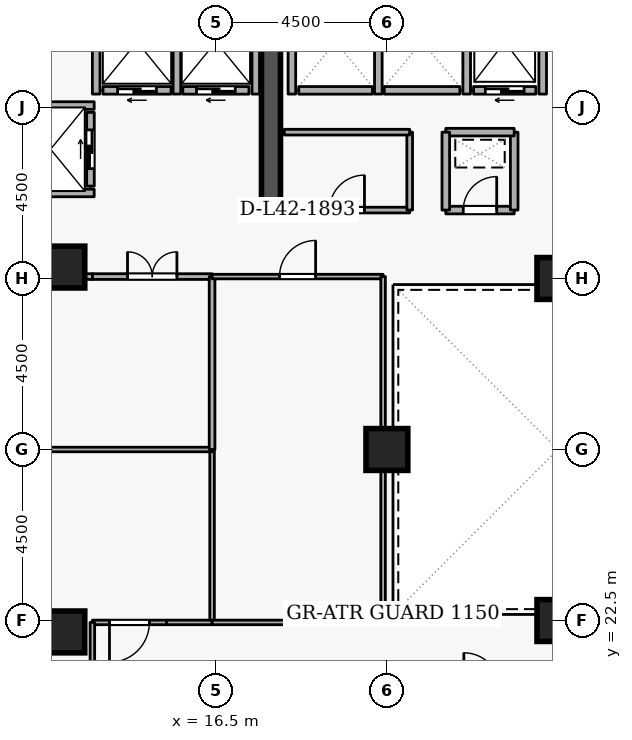
"""IFC4 building model, lengths in metres.
Left out: names, types, materials, properties, quantities, classifications, styles, units other than length and angle.
Written with IfcOpenShell. Run it as: python <this file> out.ifc"""

import sys

from ifc_helpers import new_model, si_unit, direction, frame, frame_2d, origin, origin_2d, place, context, subcontext, project, spatial, rectangle, extrude, element, fill, save


model = new_model("IFC4")
c1 = context("Model", 3, precision=1e-05, world=origin(), true_north=direction((0.0, 1.0)))
c2 = subcontext(c1, "Body", "Model", "MODEL_VIEW")
j1 = project(units=[si_unit("LENGTHUNIT", "METRE"), si_unit("PLANEANGLEUNIT", "RADIAN")], contexts=[c1])
p1 = place(None, origin())
s1 = spatial("IfcSite", under=j1, at=p1, CompositionType="ELEMENT")
p2 = place(p1, origin())
s2 = spatial("IfcBuilding", under=s1, at=p2, CompositionType="ELEMENT")
p3 = place(p2, frame((0.0, 0.0, 159.9)))
s3 = spatial("IfcBuildingStorey", under=s2, at=p3, CompositionType="ELEMENT", Elevation=159.9)
p4 = place(p3, frame((17.95, 33.1, 0.0), z_axis=(0.0, 0.0, 1.0), x_axis=(0.0, 1.0, 0.0)))
e1 = element("IfcWall", 1, at=p4, inside=s3, PredefinedType="SHEAR", context=c2, shape_type="SweptSolid", body=[
    extrude(rectangle(XDim=5.8, YDim=0.5, at=frame_2d((2.9, 0.0))), origin(), (0.0, 0.0, 1.0), 3.6),
])
for number, where, z_axis, x_axis in (
    (2, (12.5, 22.2, 0.0), (0.0, 0.0, 1.0), (1.0, 0.0, 0.0)),
    (3, (12.5, 31.8, 0.0), (0.0, 0.0, 1.0), (1.0, 0.0, 0.0)),
    (4, (25.5, 22.5, 0.0), (0.0, 0.0, 1.0), (1.0, 0.0, 0.0)),
    (5, (25.5, 31.5, 0.0), (0.0, 0.0, 1.0), (1.0, 0.0, 0.0)),
    (6, (21.0, 27.0, 0.0), (0.0, 0.0, 1.0), (1.0, 0.0, 0.0)),
):
    element("IfcColumn", number, at=place(p3, frame(where, z_axis=z_axis, x_axis=x_axis)), inside=s3, PredefinedType="COLUMN", context=c2, shape_type="SweptSolid", body=[
        extrude(rectangle(XDim=1.1, YDim=1.1, at=origin_2d()), origin(), (0.0, 0.0, 1.0), 3.6),
    ])
p5 = place(p3, frame((24.92, 36.45, 0.0), z_axis=(0.0, 0.0, 1.0), x_axis=(-1.0, 0.0, 0.0)))
e7 = element("IfcWall", 7, at=p5, inside=s3, PredefinedType="STANDARD", context=c2, shape_type="SweptSolid", body=[
    extrude(rectangle(XDim=1.64, YDim=0.2, at=frame_2d((0.82, 0.0))), origin(), (0.0, 0.0, 1.0), 3.34),
])
p6 = place(p5, frame((0.31, 0.0, 0.0)))
e8 = element("IfcOpeningElement", 8, at=p6, cuts=e7, PredefinedType="OPENING", context=c2, shape_type="SweptSolid", body=[
    extrude(rectangle(XDim=1.02, YDim=2.06, at=frame_2d((0.51, 1.03))), frame((0.0, 0.11, 0.0), z_axis=(0.0, -1.0, 0.0), x_axis=(1.0, 0.0, 0.0)), (0.0, 0.0, 1.0), 0.22),
])
p7 = place(p3, frame((22.92, 36.45, 0.0), z_axis=(0.0, 0.0, 1.0), x_axis=(-1.0, 0.0, 0.0)))
e9 = element("IfcWall", 9, at=p7, inside=s3, PredefinedType="STANDARD", context=c2, shape_type="SweptSolid", body=[
    extrude(rectangle(XDim=1.99, YDim=0.2, at=frame_2d((0.995, 0.0))), origin(), (0.0, 0.0, 1.0), 3.34),
])
p8 = place(p3, frame((20.62, 36.45, 0.0), z_axis=(0.0, 0.0, 1.0), x_axis=(-1.0, 0.0, 0.0)))
e10 = element("IfcWall", 10, at=p8, inside=s3, PredefinedType="STANDARD", context=c2, shape_type="SweptSolid", body=[
    extrude(rectangle(XDim=1.94, YDim=0.2, at=frame_2d((0.97, 0.0))), origin(), (0.0, 0.0, 1.0), 3.34),
])
p9 = place(p3, frame((17.37, 36.45, 0.0), z_axis=(0.0, 0.0, 1.0), x_axis=(-1.0, 0.0, 0.0)))
e11 = element("IfcWall", 11, at=p9, inside=s3, PredefinedType="STANDARD", context=c2, shape_type="SweptSolid", body=[
    extrude(rectangle(XDim=1.74, YDim=0.2, at=frame_2d((0.87, 0.0))), origin(), (0.0, 0.0, 1.0), 3.34),
])
p10 = place(p9, frame((0.36, 0.0, 0.0)))
e12 = element("IfcOpeningElement", 12, at=p10, cuts=e11, PredefinedType="OPENING", context=c2, shape_type="SweptSolid", body=[
    extrude(rectangle(XDim=1.02, YDim=2.06, at=frame_2d((0.51, 1.03))), frame((0.0, 0.11, 0.0), z_axis=(0.0, -1.0, 0.0), x_axis=(1.0, 0.0, 0.0)), (0.0, 0.0, 1.0), 0.22),
])
p11 = place(p3, frame((15.32, 36.45, 0.0), z_axis=(0.0, 0.0, 1.0), x_axis=(-1.0, 0.0, 0.0)))
e13 = element("IfcWall", 13, at=p11, inside=s3, PredefinedType="STANDARD", context=c2, shape_type="SweptSolid", body=[
    extrude(rectangle(XDim=1.79, YDim=0.2, at=frame_2d((0.895, 0.0))), origin(), (0.0, 0.0, 1.0), 3.34),
])
p12 = place(p11, frame((0.385, 0.0, 0.0)))
e14 = element("IfcOpeningElement", 14, at=p12, cuts=e13, PredefinedType="OPENING", context=c2, shape_type="SweptSolid", body=[
    extrude(rectangle(XDim=1.02, YDim=2.06, at=frame_2d((0.51, 1.03))), frame((0.0, 0.11, 0.0), z_axis=(0.0, -1.0, 0.0), x_axis=(1.0, 0.0, 0.0)), (0.0, 0.0, 1.0), 0.22),
])
p13 = place(p3, frame((13.2, 33.93, 0.0), z_axis=(0.0, 0.0, 1.0), x_axis=(0.0, 1.0, 0.0)))
e15 = element("IfcWall", 15, at=p13, inside=s3, PredefinedType="STANDARD", context=c2, shape_type="SweptSolid", body=[
    extrude(rectangle(XDim=1.94, YDim=0.2, at=frame_2d((0.97, 0.0))), origin(), (0.0, 0.0, 1.0), 3.34),
])
p14 = place(p13, frame((0.46, 0.0, 0.0)))
e16 = element("IfcOpeningElement", 16, at=p14, cuts=e15, PredefinedType="OPENING", context=c2, shape_type="SweptSolid", body=[
    extrude(rectangle(XDim=1.02, YDim=2.06, at=frame_2d((0.51, 1.03))), frame((0.0, 0.11, 0.0), z_axis=(0.0, -1.0, 0.0), x_axis=(1.0, 0.0, 0.0)), (0.0, 0.0, 1.0), 0.22),
])
for number, where, z_axis, x_axis in (
    (17, (25.1, 36.352, 0.0), (0.0, 0.0, 1.0), (0.0, 1.0, 0.0)),
    (18, (23.1, 36.352, 0.0), (0.0, 0.0, 1.0), (0.0, 1.0, 0.0)),
    (19, (20.775, 36.352, 0.0), (0.0, 0.0, 1.0), (0.0, 1.0, 0.0)),
    (20, (18.5, 36.352, 0.0), (0.0, 0.0, 1.0), (0.0, 1.0, 0.0)),
):
    element("IfcWall", number, at=place(p3, frame(where, z_axis=z_axis, x_axis=x_axis)), inside=s3, PredefinedType="STANDARD", context=c2, shape_type="SweptSolid", body=[
        extrude(rectangle(XDim=2.536, YDim=0.2, at=frame_2d((1.268, 0.0))), origin(), (0.0, 0.0, 1.0), 3.34),
    ])
p15 = place(p3, frame((17.55, 36.352, 0.0), z_axis=(0.0, 0.0, 1.0), x_axis=(0.0, 1.0, 0.0)))
e21 = element("IfcWall", 21, at=p15, inside=s3, PredefinedType="STANDARD", context=c2, shape_type="SweptSolid", body=[
    extrude(rectangle(XDim=2.636, YDim=0.2, at=frame_2d((1.318, 0.0))), origin(), (0.0, 0.0, 1.0), 2.545),
])
for number, where, z_axis, x_axis in (
    (22, (15.475, 36.352, 0.0), (0.0, 0.0, 1.0), (0.0, 1.0, 0.0)),
    (23, (13.35, 36.352, 0.0), (0.0, 0.0, 1.0), (0.0, 1.0, 0.0)),
):
    element("IfcWall", number, at=place(p3, frame(where, z_axis=z_axis, x_axis=x_axis)), inside=s3, PredefinedType="STANDARD", context=c2, shape_type="SweptSolid", body=[
        extrude(rectangle(XDim=2.636, YDim=0.2, at=frame_2d((1.318, 0.0))), origin(), (0.0, 0.0, 1.0), 3.34),
    ])
for number, where, z_axis, x_axis in (
    (24, (11.002, 36.05, 0.0), (0.0, 0.0, 1.0), (1.0, 0.0, 0.0)),
    (25, (11.002, 33.75, 0.0), (0.0, 0.0, 1.0), (1.0, 0.0, 0.0)),
):
    element("IfcWall", number, at=place(p3, frame(where, z_axis=z_axis, x_axis=x_axis)), inside=s3, PredefinedType="STANDARD", context=c2, shape_type="SweptSolid", body=[
        extrude(rectangle(XDim=2.296, YDim=0.2, at=frame_2d((1.148, 0.0))), origin(), (0.0, 0.0, 1.0), 3.34),
    ])
p16 = place(p3, frame((22.55, 33.3, 0.0), z_axis=(0.0, 0.0, 1.0), x_axis=(1.0, 0.0, 0.0)))
e26 = element("IfcWall", 26, at=p16, inside=s3, PredefinedType="STANDARD", context=c2, shape_type="SweptSolid", body=[
    extrude(rectangle(XDim=1.8, YDim=0.2, at=frame_2d((0.9, 0.0))), origin(), (0.0, 0.0, 1.0), 3.34),
])
p17 = place(p16, frame((0.46, 0.0, 0.0)))
e27 = element("IfcOpeningElement", 27, at=p17, cuts=e26, PredefinedType="OPENING", context=c2, shape_type="SweptSolid", body=[
    extrude(rectangle(XDim=0.88, YDim=2.04, at=frame_2d((0.44, 1.02))), frame((0.0, 0.11, 0.0), z_axis=(0.0, -1.0, 0.0), x_axis=(1.0, 0.0, 0.0)), (0.0, 0.0, 1.0), 0.22),
])
p18 = place(p3, frame((24.35, 33.3, 0.0), z_axis=(0.0, 0.0, 1.0), x_axis=(0.0, 1.0, 0.0)))
e28 = element("IfcWall", 28, at=p18, inside=s3, PredefinedType="STANDARD", context=c2, shape_type="SweptSolid", body=[
    extrude(rectangle(XDim=2.05, YDim=0.2, at=frame_2d((1.025, 0.0))), origin(), (0.0, 0.0, 1.0), 3.34),
])
p19 = place(p3, frame((24.35, 35.35, 0.0), z_axis=(0.0, 0.0, 1.0), x_axis=(-1.0, 0.0, 0.0)))
e29 = element("IfcWall", 29, at=p19, inside=s3, PredefinedType="STANDARD", context=c2, shape_type="SweptSolid", body=[
    extrude(rectangle(XDim=1.8, YDim=0.2, at=frame_2d((0.9, 0.0))), origin(), (0.0, 0.0, 1.0), 3.34),
])
p20 = place(p3, frame((22.55, 35.35, 0.0), z_axis=(0.0, 0.0, 1.0), x_axis=(0.0, -1.0, 0.0)))
e30 = element("IfcWall", 30, at=p20, inside=s3, PredefinedType="STANDARD", context=c2, shape_type="SweptSolid", body=[
    extrude(rectangle(XDim=2.05, YDim=0.2, at=frame_2d((1.025, 0.0))), origin(), (0.0, 0.0, 1.0), 3.34),
])
p21 = place(p3, frame((18.3, 33.3, 0.0), z_axis=(0.0, 0.0, 1.0), x_axis=(1.0, 0.0, 0.0)))
e31 = element("IfcWall", 31, at=p21, inside=s3, PredefinedType="PARTITIONING", context=c2, shape_type="SweptSolid", body=[
    extrude(rectangle(XDim=3.3, YDim=0.15, at=frame_2d((1.65, 0.0))), origin(), (0.0, 0.0, 1.0), 3.34),
])
p22 = place(p21, frame((1.19, 0.0, 0.0)))
e32 = element("IfcOpeningElement", 32, at=p22, cuts=e31, PredefinedType="OPENING", context=c2, shape_type="SweptSolid", body=[
    extrude(rectangle(XDim=0.92, YDim=2.08, at=frame_2d((0.46, 1.04))), frame((0.0, 0.085, 0.0), z_axis=(0.0, -1.0, 0.0), x_axis=(1.0, 0.0, 0.0)), (0.0, 0.0, 1.0), 0.17),
])
p23 = place(p3, frame((21.6, 33.3, 0.0), z_axis=(0.0, 0.0, 1.0), x_axis=(0.0, 1.0, 0.0)))
e33 = element("IfcWall", 33, at=p23, inside=s3, PredefinedType="PARTITIONING", context=c2, shape_type="SweptSolid", body=[
    extrude(rectangle(XDim=2.05, YDim=0.15, at=frame_2d((1.025, 0.0))), origin(), (0.0, 0.0, 1.0), 3.34),
])
p24 = place(p3, frame((21.6, 35.35, 0.0), z_axis=(0.0, 0.0, 1.0), x_axis=(-1.0, 0.0, 0.0)))
e34 = element("IfcWall", 34, at=p24, inside=s3, PredefinedType="PARTITIONING", context=c2, shape_type="SweptSolid", body=[
    extrude(rectangle(XDim=3.3, YDim=0.15, at=frame_2d((1.65, 0.0))), origin(), (0.0, 0.0, 1.0), 3.34),
])
p25 = place(p3, frame((16.4, 27.0, 0.0), z_axis=(0.0, 0.0, 1.0), x_axis=(0.0, -1.0, 0.0)))
e35 = element("IfcWall", 35, at=p25, inside=s3, PredefinedType="PARTITIONING", context=c2, shape_type="SweptSolid", body=[
    extrude(rectangle(XDim=4.55, YDim=0.12, at=frame_2d((2.275, 0.0))), origin(), (0.0, 0.0, 1.0), 3.34),
])
p26 = place(p3, frame((16.4, 22.45, 0.0), z_axis=(0.0, 0.0, 1.0), x_axis=(-1.0, 0.0, 0.0)))
e36 = element("IfcWall", 36, at=p26, inside=s3, PredefinedType="PARTITIONING", context=c2, shape_type="SweptSolid", body=[
    extrude(rectangle(XDim=1.2, YDim=0.12, at=frame_2d((0.6, 0.0))), origin(), (0.0, 0.0, 1.0), 3.34),
])
p27 = place(p3, frame((15.2, 22.45, 0.0), z_axis=(0.0, 0.0, 1.0), x_axis=(-1.0, 0.0, 0.0)))
e37 = element("IfcWall", 37, at=p27, inside=s3, PredefinedType="PARTITIONING", context=c2, shape_type="SweptSolid", body=[
    extrude(rectangle(XDim=1.95, YDim=0.12, at=frame_2d((0.975, 0.0))), origin(), (0.0, 0.0, 1.0), 3.34),
])
p28 = place(p27, frame((0.45, 0.0, 0.0)))
e38 = element("IfcOpeningElement", 38, at=p28, cuts=e37, PredefinedType="OPENING", context=c2, shape_type="SweptSolid", body=[
    extrude(rectangle(XDim=1.05, YDim=2.1, at=frame_2d((0.525, 1.05))), frame((0.0, 0.07, 0.0), z_axis=(0.0, -1.0, 0.0), x_axis=(1.0, 0.0, 0.0)), (0.0, 0.0, 1.0), 0.14),
])
p29 = place(p3, frame((13.25, 22.45, 0.0), z_axis=(0.0, 0.0, 1.0), x_axis=(0.0, -1.0, 0.0)))
e39 = element("IfcWall", 39, at=p29, inside=s3, PredefinedType="PARTITIONING", context=c2, shape_type="SweptSolid", body=[
    extrude(rectangle(XDim=1.75, YDim=0.12, at=frame_2d((0.875, 0.0))), origin(), (0.0, 0.0, 1.0), 3.34),
])
p30 = place(p3, frame((7.78, 27.0, 0.0), z_axis=(0.0, 0.0, 1.0), x_axis=(1.0, 0.0, 0.0)))
e40 = element("IfcWall", 40, at=p30, inside=s3, PredefinedType="PARTITIONING", context=c2, shape_type="SweptSolid", body=[
    extrude(rectangle(XDim=8.62, YDim=0.12, at=frame_2d((4.31, 0.0))), origin(), (0.0, 0.0, 1.0), 2.878),
])
p31 = place(p3, frame((13.25, 31.55, 0.0), z_axis=(0.0, 0.0, 1.0), x_axis=(1.0, 0.0, 0.0)))
e41 = element("IfcWall", 41, at=p31, inside=s3, PredefinedType="PARTITIONING", context=c2, shape_type="SweptSolid", body=[
    extrude(rectangle(XDim=3.15, YDim=0.15, at=frame_2d((1.575, 0.0))), origin(), (0.0, 0.0, 1.0), 3.34),
])
p32 = place(p31, frame((0.925, 0.0, 0.0)))
e42 = element("IfcOpeningElement", 42, at=p32, cuts=e41, PredefinedType="OPENING", context=c2, shape_type="SweptSolid", body=[
    extrude(rectangle(XDim=1.3, YDim=2.12, at=frame_2d((0.65, 1.06))), frame((0.0, 0.085, 0.0), z_axis=(0.0, -1.0, 0.0), x_axis=(1.0, 0.0, 0.0)), (0.0, 0.0, 1.0), 0.17),
])
p33 = place(p3, frame((16.4, 31.55, 0.0), z_axis=(0.0, 0.0, 1.0), x_axis=(0.0, -1.0, 0.0)))
e43 = element("IfcWall", 43, at=p33, inside=s3, PredefinedType="PARTITIONING", context=c2, shape_type="SweptSolid", body=[
    extrude(rectangle(XDim=4.55, YDim=0.15, at=frame_2d((2.275, 0.0))), origin(), (0.0, 0.0, 1.0), 3.34),
])
p34 = place(p3, frame((10.9, 31.55, 0.0), z_axis=(0.0, 0.0, 1.0), x_axis=(1.0, 0.0, 0.0)))
e44 = element("IfcWall", 44, at=p34, inside=s3, PredefinedType="PARTITIONING", context=c2, shape_type="SweptSolid", body=[
    extrude(rectangle(XDim=2.35, YDim=0.15, at=frame_2d((1.175, 0.0))), origin(), (0.0, 0.0, 1.0), 3.34),
])
p35 = place(p3, frame((16.4, 31.55, 0.0), z_axis=(0.0, 0.0, 1.0), x_axis=(1.0, 0.0, 0.0)))
e45 = element("IfcWall", 45, at=p35, inside=s3, PredefinedType="PARTITIONING", context=c2, shape_type="SweptSolid", body=[
    extrude(rectangle(XDim=4.5, YDim=0.12, at=frame_2d((2.25, 0.0))), origin(), (0.0, 0.0, 1.0), 3.34),
])
p36 = place(p35, frame((1.775, 0.0, 0.0)))
e46 = element("IfcOpeningElement", 46, at=p36, cuts=e45, PredefinedType="OPENING", context=c2, shape_type="SweptSolid", body=[
    extrude(rectangle(XDim=0.95, YDim=2.1, at=frame_2d((0.475, 1.05))), frame((0.0, 0.07, 0.0), z_axis=(0.0, -1.0, 0.0), x_axis=(1.0, 0.0, 0.0)), (0.0, 0.0, 1.0), 0.14),
])
p37 = place(p3, frame((20.9, 31.55, 0.0), z_axis=(0.0, 0.0, 1.0), x_axis=(0.0, -1.0, 0.0)))
e47 = element("IfcWall", 47, at=p37, inside=s3, PredefinedType="PARTITIONING", context=c2, shape_type="SweptSolid", body=[
    extrude(rectangle(XDim=9.1, YDim=0.12, at=frame_2d((4.55, 0.0))), origin(), (0.0, 0.0, 1.0), 3.34),
])
p38 = place(p3, frame((20.9, 22.45, 0.0), z_axis=(0.0, 0.0, 1.0), x_axis=(-1.0, 0.0, 0.0)))
e48 = element("IfcWall", 48, at=p38, inside=s3, PredefinedType="PARTITIONING", context=c2, shape_type="SweptSolid", body=[
    extrude(rectangle(XDim=4.5, YDim=0.12, at=frame_2d((2.25, 0.0))), origin(), (0.0, 0.0, 1.0), 3.34),
])
p39 = place(p6, origin())
e49 = element("IfcDoor", 49, at=p39, inside=s3, OperationType="SLIDING_TO_LEFT", PredefinedType="DOOR", context=c2, shape_type="SweptSolid", body=[
    extrude(rectangle(XDim=1.02, YDim=2.06, at=frame_2d((0.51, 1.03))), frame((0.0, 0.025, 0.0), z_axis=(0.0, -1.0, 0.0), x_axis=(1.0, 0.0, 0.0)), (0.0, 0.0, 1.0), 0.05),
])
fill(e8, e49)
p40 = place(p10, origin())
e50 = element("IfcDoor", 50, at=p40, inside=s3, OperationType="SLIDING_TO_LEFT", PredefinedType="DOOR", context=c2, shape_type="SweptSolid", body=[
    extrude(rectangle(XDim=1.02, YDim=2.06, at=frame_2d((0.51, 1.03))), frame((0.0, 0.025, 0.0), z_axis=(0.0, -1.0, 0.0), x_axis=(1.0, 0.0, 0.0)), (0.0, 0.0, 1.0), 0.05),
])
fill(e12, e50)
p41 = place(p12, origin())
e51 = element("IfcDoor", 51, at=p41, inside=s3, OperationType="SLIDING_TO_LEFT", PredefinedType="DOOR", context=c2, shape_type="SweptSolid", body=[
    extrude(rectangle(XDim=1.02, YDim=2.06, at=frame_2d((0.51, 1.03))), frame((0.0, 0.025, 0.0), z_axis=(0.0, -1.0, 0.0), x_axis=(1.0, 0.0, 0.0)), (0.0, 0.0, 1.0), 0.05),
])
fill(e14, e51)
p42 = place(p14, origin())
e52 = element("IfcDoor", 52, at=p42, inside=s3, OperationType="SLIDING_TO_LEFT", PredefinedType="DOOR", context=c2, shape_type="SweptSolid", body=[
    extrude(rectangle(XDim=1.02, YDim=2.06, at=frame_2d((0.51, 1.03))), frame((0.0, 0.025, 0.0), z_axis=(0.0, -1.0, 0.0), x_axis=(1.0, 0.0, 0.0)), (0.0, 0.0, 1.0), 0.05),
])
fill(e16, e52)
p43 = place(p17, origin())
e53 = element("IfcDoor", 53, at=p43, inside=s3, OperationType="SINGLE_SWING_RIGHT", PredefinedType="DOOR", context=c2, shape_type="SweptSolid", body=[
    extrude(rectangle(XDim=0.88, YDim=2.04, at=frame_2d((0.44, 1.02))), frame((0.0, 0.025, 0.0), z_axis=(0.0, -1.0, 0.0), x_axis=(1.0, 0.0, 0.0)), (0.0, 0.0, 1.0), 0.05),
])
fill(e27, e53)
p44 = place(p22, origin())
e54 = element("IfcDoor", 54, at=p44, inside=s3, OperationType="SINGLE_SWING_RIGHT", PredefinedType="DOOR", context=c2, shape_type="SweptSolid", body=[
    extrude(rectangle(XDim=0.92, YDim=2.08, at=frame_2d((0.46, 1.04))), frame((0.0, 0.025, 0.0), z_axis=(0.0, -1.0, 0.0), x_axis=(1.0, 0.0, 0.0)), (0.0, 0.0, 1.0), 0.05),
])
fill(e32, e54)
p45 = place(p28, origin())
e55 = element("IfcDoor", 55, at=p45, inside=s3, OperationType="SINGLE_SWING_RIGHT", PredefinedType="DOOR", context=c2, shape_type="SweptSolid", body=[
    extrude(rectangle(XDim=1.05, YDim=2.1, at=frame_2d((0.525, 1.05))), frame((0.0, 0.025, 0.0), z_axis=(0.0, -1.0, 0.0), x_axis=(1.0, 0.0, 0.0)), (0.0, 0.0, 1.0), 0.05),
])
fill(e38, e55)
p46 = place(p32, origin())
e56 = element("IfcDoor", 56, at=p46, inside=s3, OperationType="DOUBLE_DOOR_SINGLE_SWING", PredefinedType="DOOR", context=c2, shape_type="SweptSolid", body=[
    extrude(rectangle(XDim=1.3, YDim=2.12, at=frame_2d((0.65, 1.06))), frame((0.0, 0.025, 0.0), z_axis=(0.0, -1.0, 0.0), x_axis=(1.0, 0.0, 0.0)), (0.0, 0.0, 1.0), 0.05),
])
fill(e42, e56)
p47 = place(p36, origin())
e57 = element("IfcDoor", 57, at=p47, inside=s3, OperationType="SINGLE_SWING_RIGHT", PredefinedType="DOOR", context=c2, shape_type="SweptSolid", body=[
    extrude(rectangle(XDim=0.95, YDim=2.1, at=frame_2d((0.475, 1.05))), frame((0.0, 0.025, 0.0), z_axis=(0.0, -1.0, 0.0), x_axis=(1.0, 0.0, 0.0)), (0.0, 0.0, 1.0), 0.05),
])
fill(e46, e57)
save(model, sys.argv[1])
